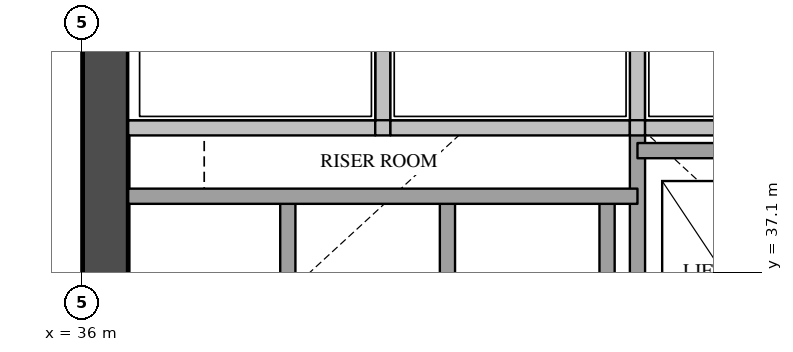
"""IFC4 building model, lengths in metres.
Left out: names, types, materials, properties, quantities, classifications, styles, units other than length and angle.
Written with IfcOpenShell. Run it as: python <this file> out.ifc"""

import sys

from ifc_helpers import new_model, si_unit, direction, frame, frame_2d, origin, place, context, subcontext, project, spatial, rectangle, extrude, element, save


model = new_model("IFC4")
c1 = context("Model", 3, precision=1e-05, world=origin(), true_north=direction((0.0, 1.0)))
c2 = subcontext(c1, "Body", "Model", "MODEL_VIEW")
j1 = project(units=[si_unit("LENGTHUNIT", "METRE"), si_unit("PLANEANGLEUNIT", "RADIAN")], contexts=[c1])
p1 = place(None, origin())
s1 = spatial("IfcSite", under=j1, at=p1, CompositionType="ELEMENT")
p2 = place(p1, origin())
s2 = spatial("IfcBuilding", under=s1, at=p2, CompositionType="ELEMENT")
p3 = place(p2, frame((0.0, 0.0, 81.6)))
s3 = spatial("IfcBuildingStorey", under=s2, at=p3, CompositionType="ELEMENT", Elevation=81.6)
p4 = place(p3, frame((36.3, 29.1, 0.0), z_axis=(0.0, 0.0, 1.0), x_axis=(0.0, 1.0, 0.0)))
e1 = element("IfcWall", 1, at=p4, inside=s3, PredefinedType="SHEAR", context=c2, shape_type="SweptSolid", body=[
    extrude(rectangle(XDim=20.3, YDim=0.6, at=frame_2d((10.15, 0.0))), origin(), (0.0, 0.0, 1.0), 3.5),
])
p5 = place(p4, frame((3.6, 0.0, 0.0)))
e2 = element("IfcOpeningElement", 2, at=p5, cuts=e1, PredefinedType="OPENING", context=c2, shape_type="SweptSolid", body=[
    extrude(rectangle(XDim=1.8, YDim=2.1, at=frame_2d((0.9, 1.05))), frame((0.0, 0.31, 0.0), z_axis=(0.0, -1.0, 0.0), x_axis=(1.0, 0.0, 0.0)), (0.0, 0.0, 1.0), 0.62),
])
p6 = place(p4, frame((16.4, 0.0, 0.0)))
e3 = element("IfcOpeningElement", 3, at=p6, cuts=e1, PredefinedType="OPENING", context=c2, shape_type="SweptSolid", body=[
    extrude(rectangle(XDim=1.0, YDim=2.1, at=frame_2d((0.5, 1.05))), frame((0.0, 0.31, 0.0), z_axis=(0.0, -1.0, 0.0), x_axis=(1.0, 0.0, 0.0)), (0.0, 0.0, 1.0), 0.62),
])
p7 = place(p3, frame((38.7, 34.9, 0.0), z_axis=(0.0, 0.0, 1.0), x_axis=(0.0, 1.0, 0.0)))
e4 = element("IfcWall", 4, at=p7, inside=s3, PredefinedType="SOLIDWALL", context=c2, shape_type="SweptSolid", body=[
    extrude(rectangle(XDim=3.2, YDim=0.2, at=frame_2d((1.6, 0.0))), origin(), (0.0, 0.0, 1.0), 3.5),
])
p8 = place(p3, frame((39.95, 39.0, 0.0), z_axis=(0.0, 0.0, 1.0), x_axis=(0.0, 1.0, 0.0)))
e5 = element("IfcWall", 5, at=p8, inside=s3, PredefinedType="SOLIDWALL", context=c2, shape_type="SweptSolid", body=[
    extrude(rectangle(XDim=1.78, YDim=0.2, at=frame_2d((0.89, 0.0))), origin(), (0.0, 0.0, 1.0), 3.5),
])
for number, where, z_axis, x_axis in (
    (6, (40.8, 34.9, 0.0), (0.0, 0.0, 1.0), (0.0, 1.0, 0.0)),
    (7, (42.9, 34.9, 0.0), (0.0, 0.0, 1.0), (0.0, 1.0, 0.0)),
):
    element("IfcWall", number, at=place(p3, frame(where, z_axis=z_axis, x_axis=x_axis)), inside=s3, PredefinedType="SOLIDWALL", context=c2, shape_type="SweptSolid", body=[
        extrude(rectangle(XDim=3.2, YDim=0.2, at=frame_2d((1.6, 0.0))), origin(), (0.0, 0.0, 1.0), 3.5),
    ])
p9 = place(p3, frame((43.3, 29.1, 0.0), z_axis=(0.0, 0.0, 1.0), x_axis=(0.0, 1.0, 0.0)))
e8 = element("IfcWall", 8, at=p9, inside=s3, PredefinedType="SOLIDWALL", context=c2, shape_type="SweptSolid", body=[
    extrude(rectangle(XDim=9.9, YDim=0.2, at=frame_2d((4.95, 0.0))), origin(), (0.0, 0.0, 1.0), 3.5),
])
p10 = place(p3, frame((43.3, 39.0, 0.0), z_axis=(0.0, 0.0, 1.0), x_axis=(0.0, 1.0, 0.0)))
e9 = element("IfcWall", 9, at=p10, inside=s3, PredefinedType="SOLIDWALL", context=c2, shape_type="SweptSolid", body=[
    extrude(rectangle(XDim=1.78, YDim=0.2, at=frame_2d((0.89, 0.0))), origin(), (0.0, 0.0, 1.0), 3.5),
])
p11 = place(p3, frame((36.6, 38.1, 0.0), z_axis=(0.0, 0.0, 1.0), x_axis=(1.0, 0.0, 0.0)))
e10 = element("IfcWall", 10, at=p11, inside=s3, PredefinedType="SOLIDWALL", context=c2, shape_type="SweptSolid", body=[
    extrude(rectangle(XDim=6.7, YDim=0.2, at=frame_2d((3.35, 0.0))), origin(), (0.0, 0.0, 1.0), 3.5),
])
p12 = place(p3, frame((43.3, 38.7, 0.0), z_axis=(0.0, 0.0, 1.0), x_axis=(1.0, 0.0, 0.0)))
e11 = element("IfcWall", 11, at=p12, inside=s3, PredefinedType="SOLIDWALL", context=c2, shape_type="SweptSolid", body=[
    extrude(rectangle(XDim=4.5, YDim=0.2, at=frame_2d((2.25, 0.0))), origin(), (0.0, 0.0, 1.0), 3.5),
])
p13 = place(p3, frame((36.6, 39.0, 0.0), z_axis=(0.0, 0.0, 1.0), x_axis=(1.0, 0.0, 0.0)))
e12 = element("IfcWall", 12, at=p13, inside=s3, PredefinedType="SOLIDWALL", context=c2, shape_type="SweptSolid", body=[
    extrude(rectangle(XDim=3.25, YDim=0.2, at=frame_2d((1.625, 0.0))), origin(), (0.0, 0.0, 1.0), 3.5),
])
p14 = place(p3, frame((39.85, 39.0, 0.0), z_axis=(0.0, 0.0, 1.0), x_axis=(1.0, 0.0, 0.0)))
e13 = element("IfcWall", 13, at=p14, inside=s3, PredefinedType="SOLIDWALL", context=c2, shape_type="SweptSolid", body=[
    extrude(rectangle(XDim=0.2, YDim=0.2, at=frame_2d((0.1, 0.0))), origin(), (0.0, 0.0, 1.0), 3.5),
])
p15 = place(p3, frame((40.05, 39.0, 0.0), z_axis=(0.0, 0.0, 1.0), x_axis=(1.0, 0.0, 0.0)))
e14 = element("IfcWall", 14, at=p15, inside=s3, PredefinedType="SOLIDWALL", context=c2, shape_type="SweptSolid", body=[
    extrude(rectangle(XDim=3.15, YDim=0.2, at=frame_2d((1.575, 0.0))), origin(), (0.0, 0.0, 1.0), 3.5),
])
p16 = place(p3, frame((43.2, 39.0, 0.0), z_axis=(0.0, 0.0, 1.0), x_axis=(1.0, 0.0, 0.0)))
e15 = element("IfcWall", 15, at=p16, inside=s3, PredefinedType="SOLIDWALL", context=c2, shape_type="SweptSolid", body=[
    extrude(rectangle(XDim=0.2, YDim=0.2, at=frame_2d((0.1, 0.0))), origin(), (0.0, 0.0, 1.0), 3.5),
])
p17 = place(p3, frame((43.4, 39.0, 0.0), z_axis=(0.0, 0.0, 1.0), x_axis=(1.0, 0.0, 0.0)))
e16 = element("IfcWall", 16, at=p17, inside=s3, PredefinedType="SOLIDWALL", context=c2, shape_type="SweptSolid", body=[
    extrude(rectangle(XDim=3.25, YDim=0.2, at=frame_2d((1.625, 0.0))), origin(), (0.0, 0.0, 1.0), 3.5),
])
save(model, sys.argv[1])
